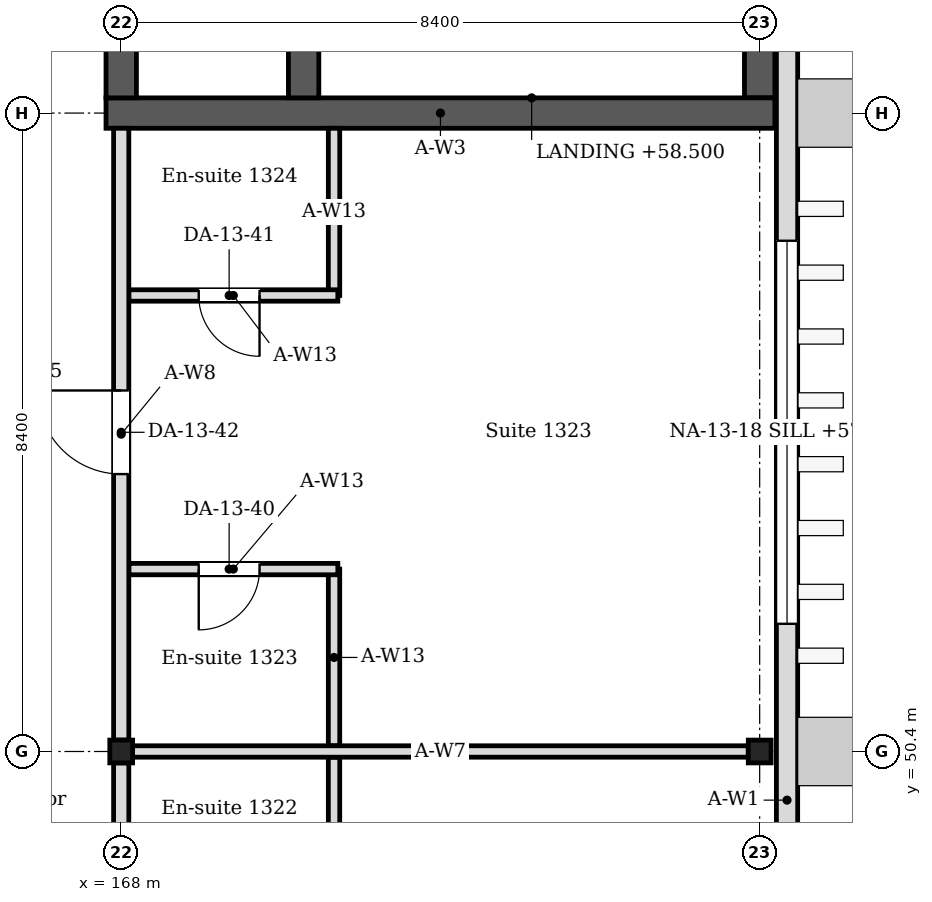
"""IFC4 building model, lengths in metres.
Left out: names, types, materials, properties, quantities, classifications, styles, units other than length and angle.
Written with IfcOpenShell. Run it as: python <this file> out.ifc"""

import sys

from ifc_helpers import new_model, si_unit, direction, frame, frame_2d, origin, origin_2d, place, context, subcontext, project, spatial, rectangle, i_section, extrude, element, fill, save


model = new_model("IFC4")
c1 = context("Model", 3, precision=1e-05, world=origin(), true_north=direction((0.0, 1.0)))
c2 = subcontext(c1, "Body", "Model", "MODEL_VIEW")
j1 = project(units=[si_unit("LENGTHUNIT", "METRE"), si_unit("PLANEANGLEUNIT", "RADIAN")], contexts=[c1])
p1 = place(None, origin())
s1 = spatial("IfcSite", under=j1, at=p1, CompositionType="ELEMENT")
p2 = place(p1, origin())
s2 = spatial("IfcBuilding", under=s1, at=p2, CompositionType="ELEMENT")
p3 = place(p2, frame((0.0, 0.0, 56.4)))
s3 = spatial("IfcBuildingStorey", under=s2, at=p3, CompositionType="ELEMENT", Elevation=56.4)
for number, where, z_axis, x_axis in (
    (1, (168.0, 50.4, 0.0), (0.0, 0.0, 1.0), (1.0, 0.0, 0.0)),
    (2, (176.4, 50.4, 0.0), (0.0, 0.0, 1.0), (1.0, 0.0, 0.0)),
):
    element("IfcColumn", number, at=place(p3, frame(where, z_axis=z_axis, x_axis=x_axis)), inside=s3, PredefinedType="COLUMN", context=c2, shape_type="SweptSolid", body=[
        extrude(i_section(OverallWidth=0.3, OverallDepth=0.3, WebThickness=0.01, FlangeThickness=0.015, FilletRadius=0.013, at=origin_2d()), origin(), (0.0, 0.0, 1.0), 4.2),
    ])
p4 = place(p3, frame((167.8, 58.8, 0.0), z_axis=(0.0, 0.0, 1.0), x_axis=(1.0, 0.0, 0.0)))
e3 = element("IfcWall", 3, at=p4, inside=s3, PredefinedType="SOLIDWALL", context=c2, shape_type="SweptSolid", body=[
    extrude(rectangle(XDim=8.8, YDim=0.4, at=frame_2d((4.4, 0.0))), origin(), (0.0, 0.0, 1.0), 4.05),
])
p5 = place(p3, frame((168.0, 59.0, 0.0), z_axis=(0.0, 0.0, 1.0), x_axis=(0.0, 1.0, 0.0)))
e4 = element("IfcWall", 4, at=p5, inside=s3, PredefinedType="SOLIDWALL", context=c2, shape_type="SweptSolid", body=[
    extrude(rectangle(XDim=8.0, YDim=0.4, at=frame_2d((4.0, 0.0))), origin(), (0.0, 0.0, 1.0), 4.05),
])
p6 = place(p5, frame((5.25, 0.0, 0.0)))
e5 = element("IfcOpeningElement", 5, at=p6, cuts=e4, PredefinedType="OPENING", context=c2, shape_type="SweptSolid", body=[
    extrude(rectangle(XDim=1.0, YDim=2.1, at=frame_2d((0.5, 1.05))), frame((0.0, 0.21, 0.0), z_axis=(0.0, -1.0, 0.0), x_axis=(1.0, 0.0, 0.0)), (0.0, 0.0, 1.0), 0.42),
])
p7 = place(p5, frame((1.275, 0.0, 0.0)))
e6 = element("IfcOpeningElement", 6, at=p7, cuts=e4, PredefinedType="OPENING", context=c2, shape_type="SweptSolid", body=[
    extrude(rectangle(XDim=1.05, YDim=2.1, at=frame_2d((0.525, 1.05))), frame((0.0, 0.21, 0.0), z_axis=(0.0, -1.0, 0.0), x_axis=(1.0, 0.0, 0.0)), (0.0, 0.0, 1.0), 0.42),
])
p8 = place(p3, frame((176.4, 59.0, 0.0), z_axis=(0.0, 0.0, 1.0), x_axis=(0.0, 1.0, 0.0)))
e7 = element("IfcWall", 7, at=p8, inside=s3, PredefinedType="SOLIDWALL", context=c2, shape_type="SweptSolid", body=[
    extrude(rectangle(XDim=8.0, YDim=0.4, at=frame_2d((4.0, 0.0))), origin(), (0.0, 0.0, 1.0), 4.05),
])
p9 = place(p3, frame((176.76, 24.85, 0.0), z_axis=(0.0, 0.0, 1.0), x_axis=(0.0, 1.0, 0.0)))
e8 = element("IfcWall", 8, at=p9, inside=s3, PredefinedType="SOLIDWALL", context=c2, shape_type="SweptSolid", body=[
    extrude(rectangle(XDim=42.57, YDim=0.28, at=frame_2d((21.285, 0.0))), origin(), (0.0, 0.0, 1.0), 4.05),
])
p10 = place(p9, frame((18.83, 0.0, 0.6)))
e9 = element("IfcOpeningElement", 9, at=p10, cuts=e8, PredefinedType="OPENING", context=c2, shape_type="SweptSolid", body=[
    extrude(rectangle(XDim=5.04, YDim=2.4, at=frame_2d((2.52, 1.2))), frame((0.0, 0.15, 0.0), z_axis=(0.0, -1.0, 0.0), x_axis=(1.0, 0.0, 0.0)), (0.0, 0.0, 1.0), 0.3),
])
p11 = place(p9, frame((27.23, 0.0, 0.6)))
e10 = element("IfcOpeningElement", 10, at=p11, cuts=e8, PredefinedType="OPENING", context=c2, shape_type="SweptSolid", body=[
    extrude(rectangle(XDim=5.04, YDim=2.4, at=frame_2d((2.52, 1.2))), frame((0.0, 0.15, 0.0), z_axis=(0.0, -1.0, 0.0), x_axis=(1.0, 0.0, 0.0)), (0.0, 0.0, 1.0), 0.3),
])
for number, where, z_axis, x_axis in (
    (11, (170.8, 48.0, 0.0), (0.0, 0.0, 1.0), (0.0, 1.0, 0.0)),
    (12, (170.8, 50.475, 0.0), (0.0, 0.0, 1.0), (0.0, 1.0, 0.0)),
):
    element("IfcWall", number, at=place(p3, frame(where, z_axis=z_axis, x_axis=x_axis)), inside=s3, PredefinedType="PARTITIONING", context=c2, shape_type="SweptSolid", body=[
        extrude(rectangle(XDim=2.325, YDim=0.15, at=frame_2d((1.163, 0.0))), origin(), (0.0, 0.0, 1.0), 4.05),
    ])
p12 = place(p3, frame((170.85, 52.8, 0.0), z_axis=(0.0, 0.0, 1.0), x_axis=(-1.0, 0.0, 0.0)))
e13 = element("IfcWall", 13, at=p12, inside=s3, PredefinedType="PARTITIONING", context=c2, shape_type="SweptSolid", body=[
    extrude(rectangle(XDim=2.75, YDim=0.15, at=frame_2d((1.375, 0.0))), origin(), (0.0, 0.0, 1.0), 4.05),
])
p13 = place(p12, frame((1.03, 0.0, 0.0)))
e14 = element("IfcOpeningElement", 14, at=p13, cuts=e13, PredefinedType="OPENING", context=c2, shape_type="SweptSolid", body=[
    extrude(rectangle(XDim=0.8, YDim=2.1, at=frame_2d((0.4, 1.05))), frame((0.0, 0.085, 0.0), z_axis=(0.0, -1.0, 0.0), x_axis=(1.0, 0.0, 0.0)), (0.0, 0.0, 1.0), 0.17),
])
p14 = place(p3, frame((170.8, 56.4, 0.0), z_axis=(0.0, 0.0, 1.0), x_axis=(0.0, 1.0, 0.0)))
e15 = element("IfcWall", 15, at=p14, inside=s3, PredefinedType="PARTITIONING", context=c2, shape_type="SweptSolid", body=[
    extrude(rectangle(XDim=2.2, YDim=0.15, at=frame_2d((1.1, 0.0))), origin(), (0.0, 0.0, 1.0), 4.05),
])
p15 = place(p3, frame((170.85, 56.4, 0.0), z_axis=(0.0, 0.0, 1.0), x_axis=(-1.0, 0.0, 0.0)))
e16 = element("IfcWall", 16, at=p15, inside=s3, PredefinedType="PARTITIONING", context=c2, shape_type="SweptSolid", body=[
    extrude(rectangle(XDim=2.75, YDim=0.15, at=frame_2d((1.375, 0.0))), origin(), (0.0, 0.0, 1.0), 4.05),
])
p16 = place(p15, frame((1.03, 0.0, 0.0)))
e17 = element("IfcOpeningElement", 17, at=p16, cuts=e16, PredefinedType="OPENING", context=c2, shape_type="SweptSolid", body=[
    extrude(rectangle(XDim=0.8, YDim=2.1, at=frame_2d((0.4, 1.05))), frame((0.0, 0.085, 0.0), z_axis=(0.0, -1.0, 0.0), x_axis=(1.0, 0.0, 0.0)), (0.0, 0.0, 1.0), 0.17),
])
p17 = place(p3, frame((168.15, 50.4, 0.0), z_axis=(0.0, 0.0, 1.0), x_axis=(1.0, 0.0, 0.0)))
e18 = element("IfcWall", 18, at=p17, inside=s3, PredefinedType="PARTITIONING", context=c2, shape_type="SweptSolid", body=[
    extrude(rectangle(XDim=8.1, YDim=0.15, at=frame_2d((4.05, 0.0))), origin(), (0.0, 0.0, 1.0), 3.604),
])
p18 = place(p3, frame((168.0, 42.25, 0.0), z_axis=(0.0, 0.0, 1.0), x_axis=(0.0, 1.0, 0.0)))
e19 = element("IfcWall", 19, at=p18, inside=s3, PredefinedType="PARTITIONING", context=c2, shape_type="SweptSolid", body=[
    extrude(rectangle(XDim=8.0, YDim=0.2, at=frame_2d((4.0, 0.0))), origin(), (0.0, 0.0, 1.0), 3.45),
])
p19 = place(p18, frame((3.4, 0.0, 0.0)))
e20 = element("IfcOpeningElement", 20, at=p19, cuts=e19, PredefinedType="OPENING", context=c2, shape_type="SweptSolid", body=[
    extrude(rectangle(XDim=1.1, YDim=2.4, at=frame_2d((0.55, 1.2))), frame((0.0, 0.11, 0.0), z_axis=(0.0, -1.0, 0.0), x_axis=(1.0, 0.0, 0.0)), (0.0, 0.0, 1.0), 0.22),
])
p20 = place(p3, frame((168.0, 50.55, 0.0), z_axis=(0.0, 0.0, 1.0), x_axis=(0.0, 1.0, 0.0)))
e21 = element("IfcWall", 21, at=p20, inside=s3, PredefinedType="PARTITIONING", context=c2, shape_type="SweptSolid", body=[
    extrude(rectangle(XDim=8.05, YDim=0.2, at=frame_2d((4.025, 0.0))), origin(), (0.0, 0.0, 1.0), 3.45),
])
p21 = place(p20, frame((3.5, 0.0, 0.0)))
e22 = element("IfcOpeningElement", 22, at=p21, cuts=e21, PredefinedType="OPENING", context=c2, shape_type="SweptSolid", body=[
    extrude(rectangle(XDim=1.1, YDim=2.4, at=frame_2d((0.55, 1.2))), frame((0.0, 0.11, 0.0), z_axis=(0.0, -1.0, 0.0), x_axis=(1.0, 0.0, 0.0)), (0.0, 0.0, 1.0), 0.22),
])
p22 = place(p3, frame((170.4, 59.0, 0.0), z_axis=(0.0, 0.0, 1.0), x_axis=(0.0, 1.0, 0.0)))
e23 = element("IfcWall", 23, at=p22, inside=s3, PredefinedType="SOLIDWALL", context=c2, shape_type="SweptSolid", body=[
    extrude(rectangle(XDim=8.0, YDim=0.4, at=frame_2d((4.0, 0.0))), origin(), (0.0, 0.0, 1.0), 4.05),
])
p23 = place(p22, frame((6.8, 0.0, 0.0)))
e24 = element("IfcOpeningElement", 24, at=p23, cuts=e23, PredefinedType="OPENING", context=c2, shape_type="SweptSolid", body=[
    extrude(rectangle(XDim=0.9, YDim=2.1, at=frame_2d((0.45, 1.05))), frame((0.0, 0.21, 0.0), z_axis=(0.0, -1.0, 0.0), x_axis=(1.0, 0.0, 0.0)), (0.0, 0.0, 1.0), 0.42),
])
p24 = place(p11, origin())
e25 = element("IfcWindow", 25, at=p24, inside=s3, PartitioningType="SINGLE_PANEL", PredefinedType="WINDOW", context=c2, shape_type="SweptSolid", body=[
    extrude(rectangle(XDim=5.04, YDim=2.4, at=frame_2d((2.52, 1.2))), frame((0.0, 0.03, 0.0), z_axis=(0.0, -1.0, 0.0), x_axis=(1.0, 0.0, 0.0)), (0.0, 0.0, 1.0), 0.06),
])
fill(e10, e25)
p25 = place(p13, origin())
e26 = element("IfcDoor", 26, at=p25, inside=s3, OperationType="SINGLE_SWING_RIGHT", PredefinedType="DOOR", context=c2, shape_type="SweptSolid", body=[
    extrude(rectangle(XDim=0.8, YDim=2.1, at=frame_2d((0.4, 1.05))), frame((0.0, 0.025, 0.0), z_axis=(0.0, -1.0, 0.0), x_axis=(1.0, 0.0, 0.0)), (0.0, 0.0, 1.0), 0.05),
])
fill(e14, e26)
p26 = place(p16, origin())
e27 = element("IfcDoor", 27, at=p26, inside=s3, OperationType="SINGLE_SWING_LEFT", PredefinedType="DOOR", context=c2, shape_type="SweptSolid", body=[
    extrude(rectangle(XDim=0.8, YDim=2.1, at=frame_2d((0.4, 1.05))), frame((0.0, 0.025, 0.0), z_axis=(0.0, -1.0, 0.0), x_axis=(1.0, 0.0, 0.0)), (0.0, 0.0, 1.0), 0.05),
])
fill(e17, e27)
p27 = place(p21, origin())
e28 = element("IfcDoor", 28, at=p27, inside=s3, OperationType="SINGLE_SWING_RIGHT", PredefinedType="DOOR", context=c2, shape_type="SweptSolid", body=[
    extrude(rectangle(XDim=1.1, YDim=2.4, at=frame_2d((0.55, 1.2))), frame((0.0, 0.025, 0.0), z_axis=(0.0, -1.0, 0.0), x_axis=(1.0, 0.0, 0.0)), (0.0, 0.0, 1.0), 0.05),
])
fill(e22, e28)
save(model, sys.argv[1])
